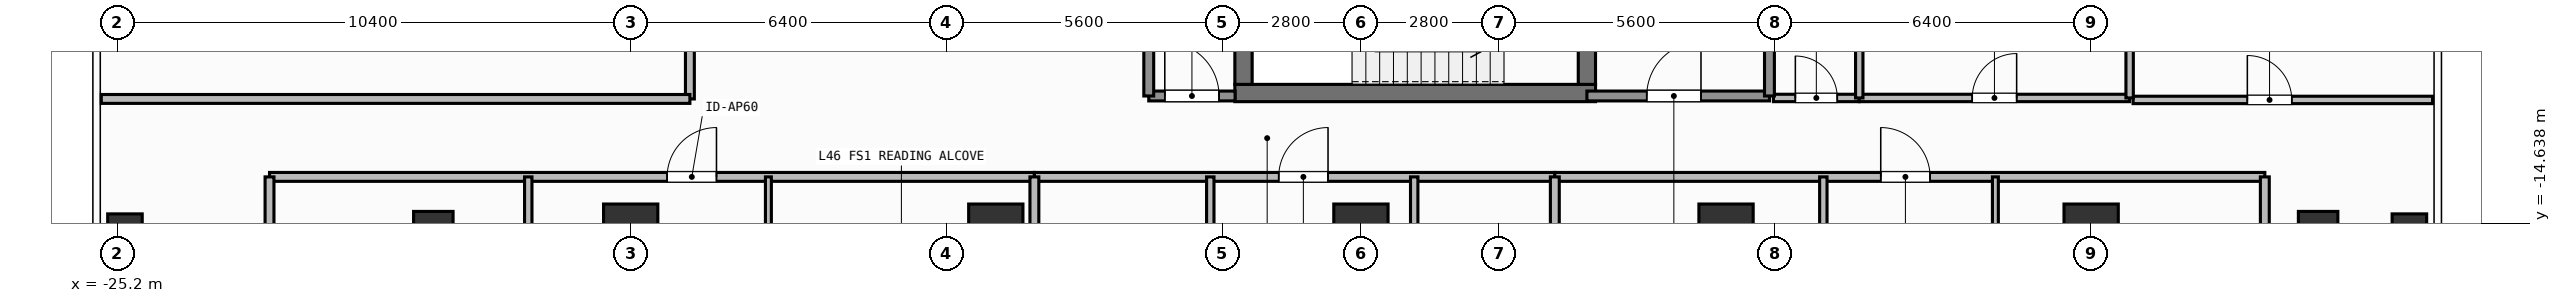
"""IFC4 building model, lengths in metres.
Left out: names, types, materials, properties, quantities, classifications, styles, units other than length and angle.
Written with IfcOpenShell. Run it as: python <this file> out.ifc"""

import sys

from ifc_helpers import new_model, si_unit, direction, frame, frame_2d, origin, origin_2d, place, context, subcontext, project, spatial, rectangle, hollow_rectangle, extrude, element, fill, save


model = new_model("IFC4")
c1 = context("Model", 3, precision=1e-05, world=origin(), true_north=direction((0.0, 1.0)))
c2 = subcontext(c1, "Body", "Model", "MODEL_VIEW")
j1 = project(units=[si_unit("LENGTHUNIT", "METRE"), si_unit("PLANEANGLEUNIT", "RADIAN")], contexts=[c1])
p1 = place(None, origin())
s1 = spatial("IfcSite", under=j1, at=p1, CompositionType="ELEMENT")
p2 = place(p1, origin())
s2 = spatial("IfcBuilding", under=s1, at=p2, CompositionType="ELEMENT")
p3 = place(p2, frame((0.0, 0.0, 187.5)))
s3 = spatial("IfcBuildingStorey", under=s2, at=p3, CompositionType="ELEMENT", Elevation=187.5)
p4 = place(p3, frame((-2.555, -12.0, 0.0), z_axis=(0.0, 0.0, 1.0), x_axis=(1.0, 0.0, 0.0)))
e1 = element("IfcWall", 1, at=p4, inside=s3, PredefinedType="SHEAR", context=c2, shape_type="SweptSolid", body=[
    extrude(rectangle(XDim=7.31, YDim=0.35, at=frame_2d((3.655, 0.0))), origin(), (0.0, 0.0, 1.0), 3.9),
])
p5 = place(p3, frame((-2.38, -11.825, 0.0), z_axis=(0.0, 0.0, 1.0), x_axis=(0.0, 1.0, 0.0)))
e2 = element("IfcWall", 2, at=p5, inside=s3, PredefinedType="SHEAR", context=c2, shape_type="SweptSolid", body=[
    extrude(rectangle(XDim=2.925, YDim=0.35, at=frame_2d((1.462, 0.0))), origin(), (0.0, 0.0, 1.0), 3.9),
])
p6 = place(p3, frame((4.58, -8.9, 0.0), z_axis=(0.0, 0.0, 1.0), x_axis=(0.0, -1.0, 0.0)))
e3 = element("IfcWall", 3, at=p6, inside=s3, PredefinedType="SHEAR", context=c2, shape_type="SweptSolid", body=[
    extrude(rectangle(XDim=2.925, YDim=0.35, at=frame_2d((1.462, 0.0))), origin(), (0.0, 0.0, 1.0), 3.9),
])
p7 = place(p6, frame((0.913, 0.0, 0.0)))
e4 = element("IfcOpeningElement", 4, at=p7, cuts=e3, PredefinedType="OPENING", context=c2, shape_type="SweptSolid", body=[
    extrude(rectangle(XDim=1.1, YDim=2.15, at=frame_2d((0.55, 1.075))), frame((0.0, 0.185, 0.0), z_axis=(0.0, -1.0, 0.0), x_axis=(1.0, 0.0, 0.0)), (0.0, 0.0, 1.0), 0.37),
])
for number, where, z_axis, x_axis in (
    (5, (-14.8, -14.8, 0.0), (0.0, 0.0, 1.0), (1.0, 0.0, 0.0)),
    (6, (-7.4, -14.8, 0.0), (0.0, 0.0, 1.0), (1.0, 0.0, 0.0)),
    (7, (0.0, -14.8, 0.0), (0.0, 0.0, 1.0), (1.0, 0.0, 0.0)),
    (8, (7.4, -14.8, 0.0), (0.0, 0.0, 1.0), (1.0, 0.0, 0.0)),
    (9, (14.8, -14.8, 0.0), (0.0, 0.0, 1.0), (1.0, 0.0, 0.0)),
):
    element("IfcColumn", number, at=place(p3, frame(where, z_axis=z_axis, x_axis=x_axis)), inside=s3, PredefinedType="COLUMN", context=c2, shape_type="SweptSolid", body=[
        extrude(rectangle(XDim=1.1, YDim=1.1, at=origin_2d()), origin(), (0.0, 0.0, 1.0), 3.9),
    ])
for number, where, z_axis, x_axis in (
    (10, (-18.8, -14.8, 0.0), (0.0, 0.0, 1.0), (1.0, 0.0, 0.0)),
    (11, (19.4, -14.8, 0.0), (0.0, 0.0, 1.0), (1.0, 0.0, 0.0)),
):
    element("IfcColumn", number, at=place(p3, frame(where, z_axis=z_axis, x_axis=x_axis)), inside=s3, PredefinedType="COLUMN", context=c2, shape_type="SweptSolid", body=[
        extrude(hollow_rectangle(XDim=0.8, YDim=0.8, WallThickness=0.036, at=origin_2d()), origin(), (0.0, 0.0, 1.0), 3.9),
    ])
for number, where, z_axis, x_axis in (
    (12, (-25.05, -14.8, 0.0), (0.0, 0.0, 1.0), (1.0, 0.0, 0.0)),
    (13, (21.25, -14.8, 0.0), (0.0, 0.0, 1.0), (1.0, 0.0, 0.0)),
):
    element("IfcColumn", number, at=place(p3, frame(where, z_axis=z_axis, x_axis=x_axis)), inside=s3, PredefinedType="COLUMN", context=c2, shape_type="SweptSolid", body=[
        extrude(hollow_rectangle(XDim=0.7, YDim=0.7, WallThickness=0.032, at=origin_2d()), origin(), (0.0, 0.0, 1.0), 3.9),
    ])
p8 = place(p3, frame((4.58, -12.06, 0.0), z_axis=(0.0, 0.0, 1.0), x_axis=(1.0, 0.0, 0.0)))
e14 = element("IfcWall", 14, at=p8, inside=s3, PredefinedType="SOLIDWALL", context=c2, shape_type="SweptSolid", body=[
    extrude(rectangle(XDim=3.7, YDim=0.2, at=frame_2d((1.85, 0.0))), origin(), (0.0, 0.0, 1.0), 3.62),
])
p9 = place(p8, frame((1.212, 0.0, 0.0)))
e15 = element("IfcOpeningElement", 15, at=p9, cuts=e14, PredefinedType="OPENING", context=c2, shape_type="SweptSolid", body=[
    extrude(rectangle(XDim=1.1, YDim=2.15, at=frame_2d((0.55, 1.075))), frame((0.0, 0.11, 0.0), z_axis=(0.0, -1.0, 0.0), x_axis=(1.0, 0.0, 0.0)), (0.0, 0.0, 1.0), 0.22),
])
p10 = place(p3, frame((-4.3, -12.06, 0.0), z_axis=(0.0, 0.0, 1.0), x_axis=(1.0, 0.0, 0.0)))
e16 = element("IfcWall", 16, at=p10, inside=s3, PredefinedType="SOLIDWALL", context=c2, shape_type="SweptSolid", body=[
    extrude(rectangle(XDim=1.75, YDim=0.2, at=frame_2d((0.875, 0.0))), origin(), (0.0, 0.0, 1.0), 3.62),
])
p11 = place(p10, frame((0.325, 0.0, 0.0)))
e17 = element("IfcOpeningElement", 17, at=p11, cuts=e16, PredefinedType="OPENING", context=c2, shape_type="SweptSolid", body=[
    extrude(rectangle(XDim=1.1, YDim=2.15, at=frame_2d((0.55, 1.075))), frame((0.0, 0.11, 0.0), z_axis=(0.0, -1.0, 0.0), x_axis=(1.0, 0.0, 0.0)), (0.0, 0.0, 1.0), 0.22),
])
p12 = place(p3, frame((8.36, -12.1, 0.0), z_axis=(0.0, 0.0, 1.0), x_axis=(1.0, 0.0, 0.0)))
e18 = element("IfcWall", 18, at=p12, inside=s3, PredefinedType="PARTITIONING", context=c2, shape_type="SweptSolid", body=[
    extrude(rectangle(XDim=1.74, YDim=0.15, at=frame_2d((0.87, 0.0))), origin(), (0.0, 0.0, 1.0), 3.62),
])
p13 = place(p12, frame((0.445, 0.0, 0.0)))
e19 = element("IfcOpeningElement", 19, at=p13, cuts=e18, PredefinedType="OPENING", context=c2, shape_type="SweptSolid", body=[
    extrude(rectangle(XDim=0.85, YDim=2.1, at=frame_2d((0.425, 1.05))), frame((0.0, 0.085, 0.0), z_axis=(0.0, -1.0, 0.0), x_axis=(1.0, 0.0, 0.0)), (0.0, 0.0, 1.0), 0.17),
])
p14 = place(p3, frame((10.1, -12.1, 0.0), z_axis=(0.0, 0.0, 1.0), x_axis=(1.0, 0.0, 0.0)))
e20 = element("IfcWall", 20, at=p14, inside=s3, PredefinedType="PARTITIONING", context=c2, shape_type="SweptSolid", body=[
    extrude(rectangle(XDim=5.48, YDim=0.15, at=frame_2d((2.74, 0.0))), origin(), (0.0, 0.0, 1.0), 3.62),
])
p15 = place(p14, frame((2.29, 0.0, 0.0)))
e21 = element("IfcOpeningElement", 21, at=p15, cuts=e20, PredefinedType="OPENING", context=c2, shape_type="SweptSolid", body=[
    extrude(rectangle(XDim=0.9, YDim=2.1, at=frame_2d((0.45, 1.05))), frame((0.0, 0.085, 0.0), z_axis=(0.0, -1.0, 0.0), x_axis=(1.0, 0.0, 0.0)), (0.0, 0.0, 1.0), 0.17),
])
p16 = place(p3, frame((-22.12, -13.7, 0.0), z_axis=(0.0, 0.0, 1.0), x_axis=(1.0, 0.0, 0.0)))
e22 = element("IfcWall", 22, at=p16, inside=s3, PredefinedType="PARTITIONING", context=c2, shape_type="SweptSolid", body=[
    extrude(rectangle(XDim=15.502, YDim=0.18, at=frame_2d((7.751, 0.0))), origin(), (0.0, 0.0, 1.0), 3.62),
])
p17 = place(p16, frame((8.059, 0.0, 0.0)))
e23 = element("IfcOpeningElement", 23, at=p17, cuts=e22, PredefinedType="OPENING", context=c2, shape_type="SweptSolid", body=[
    extrude(rectangle(XDim=1.0, YDim=2.2, at=frame_2d((0.5, 1.1))), frame((0.0, 0.1, 0.0), z_axis=(0.0, -1.0, 0.0), x_axis=(1.0, 0.0, 0.0)), (0.0, 0.0, 1.0), 0.2),
])
p18 = place(p3, frame((-16.876, -19.39, 0.0), z_axis=(0.0, 0.0, 1.0), x_axis=(0.0, 1.0, 0.0)))
e24 = element("IfcWall", 24, at=p18, inside=s3, PredefinedType="PARTITIONING", context=c2, shape_type="SweptSolid", body=[
    extrude(rectangle(XDim=5.69, YDim=0.15, at=frame_2d((2.845, 0.0))), origin(), (0.0, 0.0, 1.0), 3.62),
])
p19 = place(p18, frame((2.42, 0.0, 0.0)))
e25 = element("IfcOpeningElement", 25, at=p19, cuts=e24, PredefinedType="OPENING", context=c2, shape_type="SweptSolid", body=[
    extrude(rectangle(XDim=0.85, YDim=2.1, at=frame_2d((0.425, 1.05))), frame((0.0, 0.085, 0.0), z_axis=(0.0, -1.0, 0.0), x_axis=(1.0, 0.0, 0.0)), (0.0, 0.0, 1.0), 0.17),
])
p20 = place(p3, frame((-12.009, -17.683, 0.0), z_axis=(0.0, 0.0, 1.0), x_axis=(0.0, 1.0, 0.0)))
e26 = element("IfcWall", 26, at=p20, inside=s3, PredefinedType="PARTITIONING", context=c2, shape_type="SweptSolid", body=[
    extrude(rectangle(XDim=3.983, YDim=0.12, at=frame_2d((1.992, 0.0))), origin(), (0.0, 0.0, 1.0), 3.62),
])
p21 = place(p20, frame((1.566, 0.0, 0.0)))
e27 = element("IfcOpeningElement", 27, at=p21, cuts=e26, PredefinedType="OPENING", context=c2, shape_type="SweptSolid", body=[
    extrude(rectangle(XDim=0.85, YDim=2.1, at=frame_2d((0.425, 1.05))), frame((0.0, 0.07, 0.0), z_axis=(0.0, -1.0, 0.0), x_axis=(1.0, 0.0, 0.0)), (0.0, 0.0, 1.0), 0.14),
])
p22 = place(p3, frame((-6.618, -13.7, 0.0), z_axis=(0.0, 0.0, 1.0), x_axis=(1.0, 0.0, 0.0)))
e28 = element("IfcWall", 28, at=p22, inside=s3, PredefinedType="PARTITIONING", context=c2, shape_type="SweptSolid", body=[
    extrude(rectangle(XDim=10.548, YDim=0.18, at=frame_2d((5.274, 0.0))), origin(), (0.0, 0.0, 1.0), 3.62),
])
p23 = place(p22, frame((4.951, 0.0, 0.0)))
e29 = element("IfcOpeningElement", 29, at=p23, cuts=e28, PredefinedType="OPENING", context=c2, shape_type="SweptSolid", body=[
    extrude(rectangle(XDim=1.0, YDim=2.2, at=frame_2d((0.5, 1.1))), frame((0.0, 0.1, 0.0), z_axis=(0.0, -1.0, 0.0), x_axis=(1.0, 0.0, 0.0)), (0.0, 0.0, 1.0), 0.2),
])
p24 = place(p3, frame((-3.053, -19.39, 0.0), z_axis=(0.0, 0.0, 1.0), x_axis=(0.0, 1.0, 0.0)))
e30 = element("IfcWall", 30, at=p24, inside=s3, PredefinedType="PARTITIONING", context=c2, shape_type="SweptSolid", body=[
    extrude(rectangle(XDim=5.69, YDim=0.15, at=frame_2d((2.845, 0.0))), origin(), (0.0, 0.0, 1.0), 3.62),
])
p25 = place(p24, frame((2.42, 0.0, 0.0)))
e31 = element("IfcOpeningElement", 31, at=p25, cuts=e30, PredefinedType="OPENING", context=c2, shape_type="SweptSolid", body=[
    extrude(rectangle(XDim=0.85, YDim=2.1, at=frame_2d((0.425, 1.05))), frame((0.0, 0.085, 0.0), z_axis=(0.0, -1.0, 0.0), x_axis=(1.0, 0.0, 0.0)), (0.0, 0.0, 1.0), 0.17),
])
p26 = place(p3, frame((1.08, -19.39, 0.0), z_axis=(0.0, 0.0, 1.0), x_axis=(0.0, 1.0, 0.0)))
e32 = element("IfcWall", 32, at=p26, inside=s3, PredefinedType="PARTITIONING", context=c2, shape_type="SweptSolid", body=[
    extrude(rectangle(XDim=5.69, YDim=0.15, at=frame_2d((2.845, 0.0))), origin(), (0.0, 0.0, 1.0), 3.62),
])
p27 = place(p26, frame((2.42, 0.0, 0.0)))
e33 = element("IfcOpeningElement", 33, at=p27, cuts=e32, PredefinedType="OPENING", context=c2, shape_type="SweptSolid", body=[
    extrude(rectangle(XDim=0.85, YDim=2.1, at=frame_2d((0.425, 1.05))), frame((0.0, 0.085, 0.0), z_axis=(0.0, -1.0, 0.0), x_axis=(1.0, 0.0, 0.0)), (0.0, 0.0, 1.0), 0.17),
])
p28 = place(p3, frame((3.93, -13.7, 0.0), z_axis=(0.0, 0.0, 1.0), x_axis=(1.0, 0.0, 0.0)))
e34 = element("IfcWall", 34, at=p28, inside=s3, PredefinedType="PARTITIONING", context=c2, shape_type="SweptSolid", body=[
    extrude(rectangle(XDim=14.39, YDim=0.18, at=frame_2d((7.195, 0.0))), origin(), (0.0, 0.0, 1.0), 3.62),
])
p29 = place(p28, frame((6.605, 0.0, 0.0)))
e35 = element("IfcOpeningElement", 35, at=p29, cuts=e34, PredefinedType="OPENING", context=c2, shape_type="SweptSolid", body=[
    extrude(rectangle(XDim=1.0, YDim=2.2, at=frame_2d((0.5, 1.1))), frame((0.0, 0.1, 0.0), z_axis=(0.0, -1.0, 0.0), x_axis=(1.0, 0.0, 0.0)), (0.0, 0.0, 1.0), 0.2),
])
p30 = place(p3, frame((9.372, -19.39, 0.0), z_axis=(0.0, 0.0, 1.0), x_axis=(0.0, 1.0, 0.0)))
e36 = element("IfcWall", 36, at=p30, inside=s3, PredefinedType="PARTITIONING", context=c2, shape_type="SweptSolid", body=[
    extrude(rectangle(XDim=5.69, YDim=0.15, at=frame_2d((2.845, 0.0))), origin(), (0.0, 0.0, 1.0), 3.62),
])
p31 = place(p30, frame((2.42, 0.0, 0.0)))
e37 = element("IfcOpeningElement", 37, at=p31, cuts=e36, PredefinedType="OPENING", context=c2, shape_type="SweptSolid", body=[
    extrude(rectangle(XDim=0.85, YDim=2.1, at=frame_2d((0.425, 1.05))), frame((0.0, 0.085, 0.0), z_axis=(0.0, -1.0, 0.0), x_axis=(1.0, 0.0, 0.0)), (0.0, 0.0, 1.0), 0.17),
])
p32 = place(p3, frame((12.859, -17.683, 0.0), z_axis=(0.0, 0.0, 1.0), x_axis=(0.0, 1.0, 0.0)))
e38 = element("IfcWall", 38, at=p32, inside=s3, PredefinedType="PARTITIONING", context=c2, shape_type="SweptSolid", body=[
    extrude(rectangle(XDim=3.983, YDim=0.12, at=frame_2d((1.992, 0.0))), origin(), (0.0, 0.0, 1.0), 3.62),
])
p33 = place(p32, frame((1.391, 0.0, 0.0)))
e39 = element("IfcOpeningElement", 39, at=p33, cuts=e38, PredefinedType="OPENING", context=c2, shape_type="SweptSolid", body=[
    extrude(rectangle(XDim=0.85, YDim=2.1, at=frame_2d((0.425, 1.05))), frame((0.0, 0.07, 0.0), z_axis=(0.0, -1.0, 0.0), x_axis=(1.0, 0.0, 0.0)), (0.0, 0.0, 1.0), 0.14),
])
p34 = place(p3, frame((-13.6, -12.12, 0.0), z_axis=(0.0, 0.0, 1.0), x_axis=(0.0, 1.0, 0.0)))
e40 = element("IfcWall", 40, at=p34, inside=s3, PredefinedType="PARTITIONING", context=c2, shape_type="SweptSolid", body=[
    extrude(rectangle(XDim=6.771, YDim=0.18, at=frame_2d((3.385, 0.0))), origin(), (0.0, 0.0, 1.0), 3.62),
])
p35 = place(p34, frame((1.215, 0.0, 0.0)))
e41 = element("IfcOpeningElement", 41, at=p35, cuts=e40, PredefinedType="OPENING", context=c2, shape_type="SweptSolid", body=[
    extrude(rectangle(XDim=1.0, YDim=2.2, at=frame_2d((0.5, 1.1))), frame((0.0, 0.1, 0.0), z_axis=(0.0, -1.0, 0.0), x_axis=(1.0, 0.0, 0.0)), (0.0, 0.0, 1.0), 0.2),
])
p36 = place(p3, frame((15.65, -12.14, 0.0), z_axis=(0.0, 0.0, 1.0), x_axis=(1.0, 0.0, 0.0)))
e42 = element("IfcWall", 42, at=p36, inside=s3, PredefinedType="PARTITIONING", context=c2, shape_type="SweptSolid", body=[
    extrude(rectangle(XDim=6.07, YDim=0.15, at=frame_2d((3.035, 0.0))), origin(), (0.0, 0.0, 1.0), 3.62),
])
p37 = place(p36, frame((2.316, 0.0, 0.0)))
e43 = element("IfcOpeningElement", 43, at=p37, cuts=e42, PredefinedType="OPENING", context=c2, shape_type="SweptSolid", body=[
    extrude(rectangle(XDim=0.9, YDim=2.1, at=frame_2d((0.45, 1.05))), frame((0.0, 0.085, 0.0), z_axis=(0.0, -1.0, 0.0), x_axis=(1.0, 0.0, 0.0)), (0.0, 0.0, 1.0), 0.17),
])
for number, where, z_axis, x_axis in (
    (44, (8.28, -12.06, 0.0), (0.0, 0.0, 1.0), (0.0, 1.0, 0.0)),
    (45, (-4.3, -12.06, 0.0), (0.0, 0.0, 1.0), (0.0, 1.0, 0.0)),
):
    element("IfcWall", number, at=place(p3, frame(where, z_axis=z_axis, x_axis=x_axis)), inside=s3, PredefinedType="SOLIDWALL", context=c2, shape_type="SweptSolid", body=[
        extrude(rectangle(XDim=3.26, YDim=0.2, at=frame_2d((1.63, 0.0))), origin(), (0.0, 0.0, 1.0), 3.62),
    ])
p38 = place(p3, frame((10.1, -12.1, 0.0), z_axis=(0.0, 0.0, 1.0), x_axis=(0.0, 1.0, 0.0)))
e46 = element("IfcWall", 46, at=p38, inside=s3, PredefinedType="PARTITIONING", context=c2, shape_type="SweptSolid", body=[
    extrude(rectangle(XDim=2.35, YDim=0.15, at=frame_2d((1.175, 0.0))), origin(), (0.0, 0.0, 1.0), 3.62),
])
p39 = place(p3, frame((15.58, -12.1, 0.0), z_axis=(0.0, 0.0, 1.0), x_axis=(0.0, 1.0, 0.0)))
e47 = element("IfcWall", 47, at=p39, inside=s3, PredefinedType="PARTITIONING", context=c2, shape_type="SweptSolid", body=[
    extrude(rectangle(XDim=6.25, YDim=0.15, at=frame_2d((3.125, 0.0))), origin(), (0.0, 0.0, 1.0), 3.62),
])
for number, where, z_axis, x_axis in (
    (48, (-22.12, -22.51, 0.0), (0.0, 0.0, 1.0), (0.0, 1.0, 0.0)),
    (49, (18.32, -22.51, 0.0), (0.0, 0.0, 1.0), (0.0, 1.0, 0.0)),
):
    element("IfcWall", number, at=place(p3, frame(where, z_axis=z_axis, x_axis=x_axis)), inside=s3, PredefinedType="PARTITIONING", context=c2, shape_type="SweptSolid", body=[
        extrude(rectangle(XDim=8.81, YDim=0.18, at=frame_2d((4.405, 0.0))), origin(), (0.0, 0.0, 1.0), 3.62),
    ])
for number, where, z_axis, x_axis in (
    (50, (-6.618, -23.63, 0.0), (0.0, 0.0, 1.0), (0.0, 1.0, 0.0)),
    (51, (3.93, -23.63, 0.0), (0.0, 0.0, 1.0), (0.0, 1.0, 0.0)),
):
    element("IfcWall", number, at=place(p3, frame(where, z_axis=z_axis, x_axis=x_axis)), inside=s3, PredefinedType="PARTITIONING", context=c2, shape_type="SweptSolid", body=[
        extrude(rectangle(XDim=9.93, YDim=0.18, at=frame_2d((4.965, 0.0))), origin(), (0.0, 0.0, 1.0), 3.62),
    ])
p40 = place(p3, frame((-25.53, -12.12, 0.0), z_axis=(0.0, 0.0, 1.0), x_axis=(1.0, 0.0, 0.0)))
e52 = element("IfcWall", 52, at=p40, inside=s3, PredefinedType="PARTITIONING", context=c2, shape_type="SweptSolid", body=[
    extrude(rectangle(XDim=11.93, YDim=0.18, at=frame_2d((5.965, 0.0))), origin(), (0.0, 0.0, 1.0), 3.62),
])
p41 = place(p9, origin())
e53 = element("IfcDoor", 53, at=p41, inside=s3, OperationType="SINGLE_SWING_RIGHT", PredefinedType="DOOR", context=c2, shape_type="SweptSolid", body=[
    extrude(rectangle(XDim=1.1, YDim=2.15, at=frame_2d((0.55, 1.075))), frame((0.0, 0.025, 0.0), z_axis=(0.0, -1.0, 0.0), x_axis=(1.0, 0.0, 0.0)), (0.0, 0.0, 1.0), 0.05),
])
fill(e15, e53)
p42 = place(p11, origin())
e54 = element("IfcDoor", 54, at=p42, inside=s3, OperationType="SINGLE_SWING_LEFT", PredefinedType="DOOR", context=c2, shape_type="SweptSolid", body=[
    extrude(rectangle(XDim=1.1, YDim=2.15, at=frame_2d((0.55, 1.075))), frame((0.0, 0.025, 0.0), z_axis=(0.0, -1.0, 0.0), x_axis=(1.0, 0.0, 0.0)), (0.0, 0.0, 1.0), 0.05),
])
fill(e17, e54)
p43 = place(p13, origin())
e55 = element("IfcDoor", 55, at=p43, inside=s3, OperationType="SINGLE_SWING_LEFT", PredefinedType="DOOR", context=c2, shape_type="SweptSolid", body=[
    extrude(rectangle(XDim=0.85, YDim=2.1, at=frame_2d((0.425, 1.05))), frame((0.0, 0.025, 0.0), z_axis=(0.0, -1.0, 0.0), x_axis=(1.0, 0.0, 0.0)), (0.0, 0.0, 1.0), 0.05),
])
fill(e19, e55)
p44 = place(p15, origin())
e56 = element("IfcDoor", 56, at=p44, inside=s3, OperationType="SINGLE_SWING_RIGHT", PredefinedType="DOOR", context=c2, shape_type="SweptSolid", body=[
    extrude(rectangle(XDim=0.9, YDim=2.1, at=frame_2d((0.45, 1.05))), frame((0.0, 0.025, 0.0), z_axis=(0.0, -1.0, 0.0), x_axis=(1.0, 0.0, 0.0)), (0.0, 0.0, 1.0), 0.05),
])
fill(e21, e56)
p45 = place(p17, origin())
e57 = element("IfcDoor", 57, at=p45, inside=s3, OperationType="SINGLE_SWING_RIGHT", PredefinedType="DOOR", context=c2, shape_type="SweptSolid", body=[
    extrude(rectangle(XDim=1.0, YDim=2.2, at=frame_2d((0.5, 1.1))), frame((0.0, 0.025, 0.0), z_axis=(0.0, -1.0, 0.0), x_axis=(1.0, 0.0, 0.0)), (0.0, 0.0, 1.0), 0.05),
])
fill(e23, e57)
p46 = place(p23, origin())
e58 = element("IfcDoor", 58, at=p46, inside=s3, OperationType="SINGLE_SWING_RIGHT", PredefinedType="DOOR", context=c2, shape_type="SweptSolid", body=[
    extrude(rectangle(XDim=1.0, YDim=2.2, at=frame_2d((0.5, 1.1))), frame((0.0, 0.025, 0.0), z_axis=(0.0, -1.0, 0.0), x_axis=(1.0, 0.0, 0.0)), (0.0, 0.0, 1.0), 0.05),
])
fill(e29, e58)
p47 = place(p29, origin())
e59 = element("IfcDoor", 59, at=p47, inside=s3, OperationType="SINGLE_SWING_LEFT", PredefinedType="DOOR", context=c2, shape_type="SweptSolid", body=[
    extrude(rectangle(XDim=1.0, YDim=2.2, at=frame_2d((0.5, 1.1))), frame((0.0, 0.025, 0.0), z_axis=(0.0, -1.0, 0.0), x_axis=(1.0, 0.0, 0.0)), (0.0, 0.0, 1.0), 0.05),
])
fill(e35, e59)
p48 = place(p37, origin())
e60 = element("IfcDoor", 60, at=p48, inside=s3, OperationType="SINGLE_SWING_LEFT", PredefinedType="DOOR", context=c2, shape_type="SweptSolid", body=[
    extrude(rectangle(XDim=0.9, YDim=2.1, at=frame_2d((0.45, 1.05))), frame((0.0, 0.025, 0.0), z_axis=(0.0, -1.0, 0.0), x_axis=(1.0, 0.0, 0.0)), (0.0, 0.0, 1.0), 0.05),
])
fill(e43, e60)
save(model, sys.argv[1])
